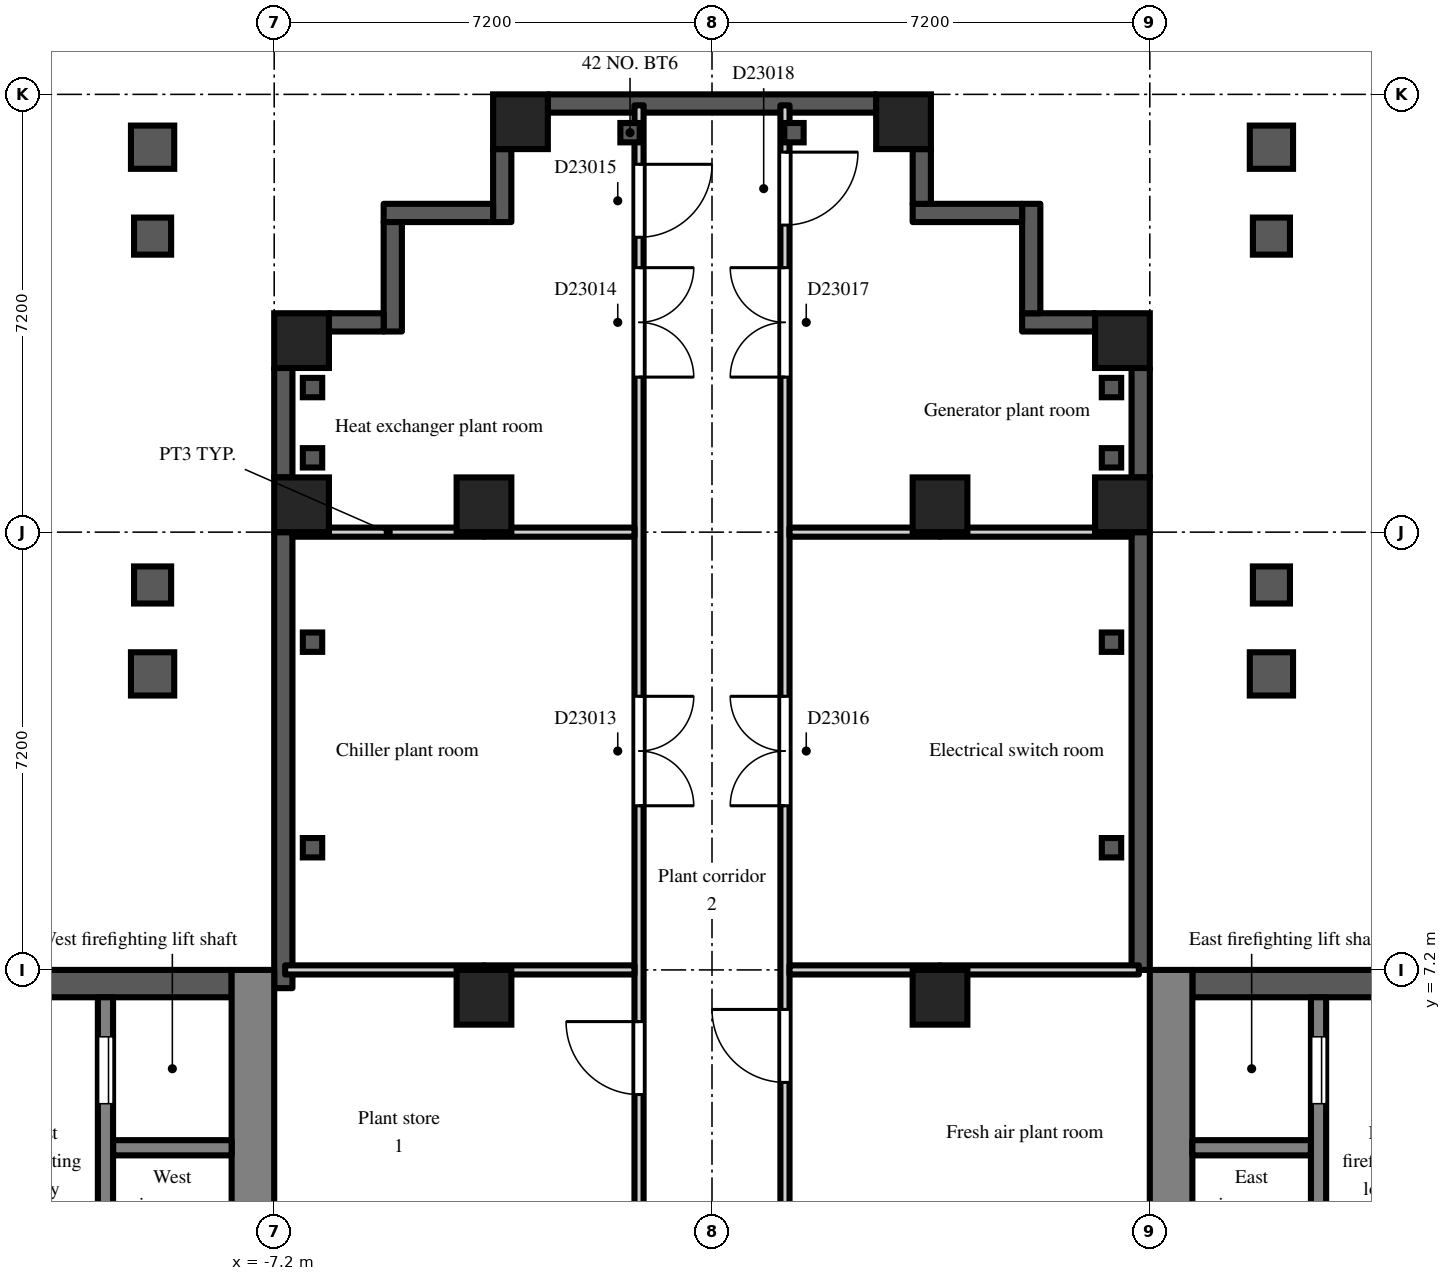
"""IFC4 building model, lengths in metres.
Left out: names, types, materials, properties, quantities, classifications, styles, units other than length and angle.
Written with IfcOpenShell. Run it as: python <this file> out.ifc"""

import sys

from ifc_helpers import new_model, si_unit, direction, frame, frame_2d, origin, origin_2d, place, context, subcontext, project, spatial, rectangle, extrude, element, fill, save


model = new_model("IFC4")
c1 = context("Model", 3, precision=1e-05, world=origin(), true_north=direction((0.0, 1.0)))
c2 = subcontext(c1, "Body", "Model", "MODEL_VIEW")
j1 = project(units=[si_unit("LENGTHUNIT", "METRE"), si_unit("PLANEANGLEUNIT", "RADIAN")], contexts=[c1])
p1 = place(None, origin())
s1 = spatial("IfcSite", under=j1, at=p1, CompositionType="ELEMENT")
p2 = place(p1, origin())
s2 = spatial("IfcBuilding", under=s1, at=p2, CompositionType="ELEMENT")
p3 = place(p2, frame((0.0, 0.0, 162.3)))
s3 = spatial("IfcBuildingStorey", under=s2, at=p3, CompositionType="ELEMENT", Elevation=162.3)
for number, where, z_axis, x_axis in (
    (1, (-6.75, 14.85, 0.0), (0.0, 0.0, 1.0), (1.0, 0.0, 0.0)),
    (2, (-6.75, 17.55, 0.0), (0.0, 0.0, 1.0), (1.0, 0.0, 0.0)),
    (3, (-3.75, 6.75, 0.0), (0.0, 0.0, 1.0), (1.0, 0.0, 0.0)),
    (4, (-3.75, 14.85, 0.0), (0.0, 0.0, 1.0), (1.0, 0.0, 0.0)),
    (5, (-3.15, 21.15, 0.0), (0.0, 0.0, 1.0), (1.0, 0.0, 0.0)),
    (6, (3.15, 21.15, 0.0), (0.0, 0.0, 1.0), (1.0, 0.0, 0.0)),
    (7, (3.75, 6.75, 0.0), (0.0, 0.0, 1.0), (1.0, 0.0, 0.0)),
    (8, (3.75, 14.85, 0.0), (0.0, 0.0, 1.0), (1.0, 0.0, 0.0)),
    (9, (6.75, 14.85, 0.0), (0.0, 0.0, 1.0), (1.0, 0.0, 0.0)),
    (10, (6.75, 17.55, 0.0), (0.0, 0.0, 1.0), (1.0, 0.0, 0.0)),
):
    element("IfcColumn", number, at=place(p3, frame(where, z_axis=z_axis, x_axis=x_axis)), inside=s3, PredefinedType="COLUMN", context=c2, shape_type="SweptSolid", body=[
        extrude(rectangle(XDim=0.9, YDim=0.9, at=origin_2d()), origin(), (0.0, 0.0, 1.0), 4.2),
    ])
p4 = place(p3, frame((7.05, 7.2, 0.0), z_axis=(0.0, 0.0, 1.0), x_axis=(0.0, 1.0, 0.0)))
e11 = element("IfcWall", 11, at=p4, inside=s3, PredefinedType="SOLIDWALL", context=c2, shape_type="SweptSolid", body=[
    extrude(rectangle(XDim=7.2, YDim=0.3, at=frame_2d((3.6, 0.0))), origin(), (0.0, 0.0, 1.0), 3.8),
])
p5 = place(p3, frame((7.05, 15.3, 0.0), z_axis=(0.0, 0.0, 1.0), x_axis=(0.0, 1.0, 0.0)))
e12 = element("IfcWall", 12, at=p5, inside=s3, PredefinedType="SOLIDWALL", context=c2, shape_type="SweptSolid", body=[
    extrude(rectangle(XDim=1.8, YDim=0.3, at=frame_2d((0.9, 0.0))), origin(), (0.0, 0.0, 1.0), 3.4),
])
p6 = place(p3, frame((6.3, 17.85, 0.0), z_axis=(0.0, 0.0, 1.0), x_axis=(-1.0, 0.0, 0.0)))
e13 = element("IfcWall", 13, at=p6, inside=s3, PredefinedType="SOLIDWALL", context=c2, shape_type="SweptSolid", body=[
    extrude(rectangle(XDim=1.2, YDim=0.3, at=frame_2d((0.6, 0.0))), origin(), (0.0, 0.0, 1.0), 3.8),
])
for number, where, z_axis, x_axis in (
    (14, (5.25, 18.0, 0.0), (0.0, 0.0, 1.0), (0.0, 1.0, 0.0)),
    (15, (5.1, 19.65, 0.0), (0.0, 0.0, 1.0), (-1.0, 0.0, 0.0)),
):
    element("IfcWall", number, at=place(p3, frame(where, z_axis=z_axis, x_axis=x_axis)), inside=s3, PredefinedType="SOLIDWALL", context=c2, shape_type="SweptSolid", body=[
        extrude(rectangle(XDim=1.8, YDim=0.3, at=frame_2d((0.9, 0.0))), origin(), (0.0, 0.0, 1.0), 3.8),
    ])
p7 = place(p3, frame((3.45, 19.8, 0.0), z_axis=(0.0, 0.0, 1.0), x_axis=(0.0, 1.0, 0.0)))
e16 = element("IfcWall", 16, at=p7, inside=s3, PredefinedType="SOLIDWALL", context=c2, shape_type="SweptSolid", body=[
    extrude(rectangle(XDim=0.9, YDim=0.3, at=frame_2d((0.45, 0.0))), origin(), (0.0, 0.0, 1.0), 3.8),
])
p8 = place(p3, frame((2.7, 21.45, 0.0), z_axis=(0.0, 0.0, 1.0), x_axis=(-1.0, 0.0, 0.0)))
e17 = element("IfcWall", 17, at=p8, inside=s3, PredefinedType="SOLIDWALL", context=c2, shape_type="SweptSolid", body=[
    extrude(rectangle(XDim=5.4, YDim=0.3, at=frame_2d((2.7, 0.0))), origin(), (0.0, 0.0, 1.0), 3.4),
])
p9 = place(p3, frame((-3.45, 20.7, 0.0), z_axis=(0.0, 0.0, 1.0), x_axis=(0.0, -1.0, 0.0)))
e18 = element("IfcWall", 18, at=p9, inside=s3, PredefinedType="SOLIDWALL", context=c2, shape_type="SweptSolid", body=[
    extrude(rectangle(XDim=1.2, YDim=0.3, at=frame_2d((0.6, 0.0))), origin(), (0.0, 0.0, 1.0), 3.8),
])
p10 = place(p3, frame((-3.6, 19.65, 0.0), z_axis=(0.0, 0.0, 1.0), x_axis=(-1.0, 0.0, 0.0)))
e19 = element("IfcWall", 19, at=p10, inside=s3, PredefinedType="SOLIDWALL", context=c2, shape_type="SweptSolid", body=[
    extrude(rectangle(XDim=1.8, YDim=0.3, at=frame_2d((0.9, 0.0))), origin(), (0.0, 0.0, 1.0), 3.8),
])
p11 = place(p3, frame((-5.25, 19.5, 0.0), z_axis=(0.0, 0.0, 1.0), x_axis=(0.0, -1.0, 0.0)))
e20 = element("IfcWall", 20, at=p11, inside=s3, PredefinedType="SOLIDWALL", context=c2, shape_type="SweptSolid", body=[
    extrude(rectangle(XDim=1.8, YDim=0.3, at=frame_2d((0.9, 0.0))), origin(), (0.0, 0.0, 1.0), 3.8),
])
p12 = place(p3, frame((-5.4, 17.85, 0.0), z_axis=(0.0, 0.0, 1.0), x_axis=(-1.0, 0.0, 0.0)))
e21 = element("IfcWall", 21, at=p12, inside=s3, PredefinedType="SOLIDWALL", context=c2, shape_type="SweptSolid", body=[
    extrude(rectangle(XDim=0.9, YDim=0.3, at=frame_2d((0.45, 0.0))), origin(), (0.0, 0.0, 1.0), 3.8),
])
p13 = place(p3, frame((-7.05, 17.1, 0.0), z_axis=(0.0, 0.0, 1.0), x_axis=(0.0, -1.0, 0.0)))
e22 = element("IfcWall", 22, at=p13, inside=s3, PredefinedType="SOLIDWALL", context=c2, shape_type="SweptSolid", body=[
    extrude(rectangle(XDim=1.8, YDim=0.3, at=frame_2d((0.9, 0.0))), origin(), (0.0, 0.0, 1.0), 3.4),
])
p14 = place(p3, frame((-7.05, 14.4, 0.0), z_axis=(0.0, 0.0, 1.0), x_axis=(0.0, -1.0, 0.0)))
e23 = element("IfcWall", 23, at=p14, inside=s3, PredefinedType="SOLIDWALL", context=c2, shape_type="SweptSolid", body=[
    extrude(rectangle(XDim=7.5, YDim=0.3, at=frame_2d((3.75, 0.0))), origin(), (0.0, 0.0, 1.0), 3.8),
])
p15 = place(p3, frame((7.55, -7.2, 0.0), z_axis=(0.0, 0.0, 1.0), x_axis=(0.0, 1.0, 0.0)))
e24 = element("IfcWall", 24, at=p15, inside=s3, PredefinedType="SHEAR", context=c2, shape_type="SweptSolid", body=[
    extrude(rectangle(XDim=14.4, YDim=0.7, at=frame_2d((7.2, 0.0))), origin(), (0.0, 0.0, 1.0), 3.8),
])
p16 = place(p15, frame((6.0, 0.0, 0.0)))
e25 = element("IfcOpeningElement", 25, at=p16, cuts=e24, PredefinedType="OPENING", context=c2, shape_type="SweptSolid", body=[
    extrude(rectangle(XDim=2.4, YDim=2.2, at=frame_2d((1.2, 1.1))), frame((0.0, 0.36, 0.0), z_axis=(0.0, -1.0, 0.0), x_axis=(1.0, 0.0, 0.0)), (0.0, 0.0, 1.0), 0.72),
])
p17 = place(p3, frame((7.9, 6.975, 0.0), z_axis=(0.0, 0.0, 1.0), x_axis=(1.0, 0.0, 0.0)))
e26 = element("IfcWall", 26, at=p17, inside=s3, PredefinedType="SHEAR", context=c2, shape_type="SweptSolid", body=[
    extrude(rectangle(XDim=12.95, YDim=0.45, at=frame_2d((6.475, 0.0))), origin(), (0.0, 0.0, 1.0), 3.8),
])
p18 = place(p3, frame((7.9, 4.275, 0.0), z_axis=(0.0, 0.0, 1.0), x_axis=(1.0, 0.0, 0.0)))
e27 = element("IfcWall", 27, at=p18, inside=s3, PredefinedType="SHEAR", context=c2, shape_type="SweptSolid", body=[
    extrude(rectangle(XDim=1.95, YDim=0.25, at=frame_2d((0.975, 0.0))), origin(), (0.0, 0.0, 1.0), 3.8),
])
p19 = place(p3, frame((9.975, 2.05, 0.0), z_axis=(0.0, 0.0, 1.0), x_axis=(0.0, 1.0, 0.0)))
e28 = element("IfcWall", 28, at=p19, inside=s3, PredefinedType="SHEAR", context=c2, shape_type="SweptSolid", body=[
    extrude(rectangle(XDim=4.7, YDim=0.25, at=frame_2d((2.35, 0.0))), origin(), (0.0, 0.0, 1.0), 3.8),
])
p20 = place(p19, frame((2.95, 0.0, 0.0)))
e29 = element("IfcOpeningElement", 29, at=p20, cuts=e28, PredefinedType="OPENING", context=c2, shape_type="SweptSolid", body=[
    extrude(rectangle(XDim=1.1, YDim=2.1, at=frame_2d((0.55, 1.05))), frame((0.0, 0.135, 0.0), z_axis=(0.0, -1.0, 0.0), x_axis=(1.0, 0.0, 0.0)), (0.0, 0.0, 1.0), 0.27),
])
p21 = place(p3, frame((-7.55, -7.2, 0.0), z_axis=(0.0, 0.0, 1.0), x_axis=(0.0, 1.0, 0.0)))
e30 = element("IfcWall", 30, at=p21, inside=s3, PredefinedType="SHEAR", context=c2, shape_type="SweptSolid", body=[
    extrude(rectangle(XDim=14.4, YDim=0.7, at=frame_2d((7.2, 0.0))), origin(), (0.0, 0.0, 1.0), 3.8),
])
p22 = place(p21, frame((6.0, 0.0, 0.0)))
e31 = element("IfcOpeningElement", 31, at=p22, cuts=e30, PredefinedType="OPENING", context=c2, shape_type="SweptSolid", body=[
    extrude(rectangle(XDim=2.4, YDim=2.2, at=frame_2d((1.2, 1.1))), frame((0.0, 0.36, 0.0), z_axis=(0.0, -1.0, 0.0), x_axis=(1.0, 0.0, 0.0)), (0.0, 0.0, 1.0), 0.72),
])
p23 = place(p3, frame((-7.9, 6.975, 0.0), z_axis=(0.0, 0.0, 1.0), x_axis=(-1.0, 0.0, 0.0)))
e32 = element("IfcWall", 32, at=p23, inside=s3, PredefinedType="SHEAR", context=c2, shape_type="SweptSolid", body=[
    extrude(rectangle(XDim=12.95, YDim=0.45, at=frame_2d((6.475, 0.0))), origin(), (0.0, 0.0, 1.0), 3.8),
])
p24 = place(p3, frame((-7.9, 4.275, 0.0), z_axis=(0.0, 0.0, 1.0), x_axis=(-1.0, 0.0, 0.0)))
e33 = element("IfcWall", 33, at=p24, inside=s3, PredefinedType="SHEAR", context=c2, shape_type="SweptSolid", body=[
    extrude(rectangle(XDim=1.95, YDim=0.25, at=frame_2d((0.975, 0.0))), origin(), (0.0, 0.0, 1.0), 3.8),
])
p25 = place(p3, frame((-9.975, 2.05, 0.0), z_axis=(0.0, 0.0, 1.0), x_axis=(0.0, 1.0, 0.0)))
e34 = element("IfcWall", 34, at=p25, inside=s3, PredefinedType="SHEAR", context=c2, shape_type="SweptSolid", body=[
    extrude(rectangle(XDim=4.7, YDim=0.25, at=frame_2d((2.35, 0.0))), origin(), (0.0, 0.0, 1.0), 3.8),
])
p26 = place(p25, frame((2.95, 0.0, 0.0)))
e35 = element("IfcOpeningElement", 35, at=p26, cuts=e34, PredefinedType="OPENING", context=c2, shape_type="SweptSolid", body=[
    extrude(rectangle(XDim=1.1, YDim=2.1, at=frame_2d((0.55, 1.05))), frame((0.0, 0.135, 0.0), z_axis=(0.0, -1.0, 0.0), x_axis=(1.0, 0.0, 0.0)), (0.0, 0.0, 1.0), 0.27),
])
p27 = place(p3, frame((-7.02, 7.2, 0.0), z_axis=(0.0, 0.0, 1.0), x_axis=(1.0, 0.0, 0.0)))
e36 = element("IfcWall", 36, at=p27, inside=s3, PredefinedType="PARTITIONING", context=c2, shape_type="SweptSolid", body=[
    extrude(rectangle(XDim=3.27, YDim=0.15, at=frame_2d((1.635, 0.0))), origin(), (0.0, 0.0, 1.0), 3.4),
])
p28 = place(p3, frame((-6.9, 14.4, 0.0), z_axis=(0.0, 0.0, 1.0), x_axis=(1.0, 0.0, 0.0)))
e37 = element("IfcWall", 37, at=p28, inside=s3, PredefinedType="PARTITIONING", context=c2, shape_type="SweptSolid", body=[
    extrude(rectangle(XDim=3.15, YDim=0.15, at=frame_2d((1.575, 0.0))), origin(), (0.0, 0.0, 1.0), 3.4),
])
p29 = place(p3, frame((-1.2, 1.125, 0.0), z_axis=(0.0, 0.0, 1.0), x_axis=(0.0, 1.0, 0.0)))
e38 = element("IfcWall", 38, at=p29, inside=s3, PredefinedType="PARTITIONING", context=c2, shape_type="SweptSolid", body=[
    extrude(rectangle(XDim=20.295, YDim=0.15, at=frame_2d((10.147, 0.0))), origin(), (0.0, 0.0, 1.0), 3.8),
])
p30 = place(p29, frame((4.025, 0.0, 0.0)))
e39 = element("IfcOpeningElement", 39, at=p30, cuts=e38, PredefinedType="OPENING", context=c2, shape_type="SweptSolid", body=[
    extrude(rectangle(XDim=1.2, YDim=2.1, at=frame_2d((0.6, 1.05))), frame((0.0, 0.085, 0.0), z_axis=(0.0, -1.0, 0.0), x_axis=(1.0, 0.0, 0.0)), (0.0, 0.0, 1.0), 0.17),
])
p31 = place(p29, frame((8.775, 0.0, 0.0)))
e40 = element("IfcOpeningElement", 40, at=p31, cuts=e38, PredefinedType="OPENING", context=c2, shape_type="SweptSolid", body=[
    extrude(rectangle(XDim=1.8, YDim=2.1, at=frame_2d((0.9, 1.05))), frame((0.0, 0.085, 0.0), z_axis=(0.0, -1.0, 0.0), x_axis=(1.0, 0.0, 0.0)), (0.0, 0.0, 1.0), 0.17),
])
p32 = place(p29, frame((15.825, 0.0, 0.0)))
e41 = element("IfcOpeningElement", 41, at=p32, cuts=e38, PredefinedType="OPENING", context=c2, shape_type="SweptSolid", body=[
    extrude(rectangle(XDim=1.8, YDim=2.1, at=frame_2d((0.9, 1.05))), frame((0.0, 0.085, 0.0), z_axis=(0.0, -1.0, 0.0), x_axis=(1.0, 0.0, 0.0)), (0.0, 0.0, 1.0), 0.17),
])
p33 = place(p29, frame((18.125, 0.0, 0.0)))
e42 = element("IfcOpeningElement", 42, at=p33, cuts=e38, PredefinedType="OPENING", context=c2, shape_type="SweptSolid", body=[
    extrude(rectangle(XDim=1.2, YDim=2.1, at=frame_2d((0.6, 1.05))), frame((0.0, 0.085, 0.0), z_axis=(0.0, -1.0, 0.0), x_axis=(1.0, 0.0, 0.0)), (0.0, 0.0, 1.0), 0.17),
])
p34 = place(p3, frame((1.2, 1.125, 0.0), z_axis=(0.0, 0.0, 1.0), x_axis=(0.0, 1.0, 0.0)))
e43 = element("IfcWall", 43, at=p34, inside=s3, PredefinedType="PARTITIONING", context=c2, shape_type="SweptSolid", body=[
    extrude(rectangle(XDim=20.295, YDim=0.15, at=frame_2d((10.147, 0.0))), origin(), (0.0, 0.0, 1.0), 3.8),
])
p35 = place(p34, frame((0.175, 0.0, 0.0)))
e44 = element("IfcOpeningElement", 44, at=p35, cuts=e43, PredefinedType="OPENING", context=c2, shape_type="SweptSolid", body=[
    extrude(rectangle(XDim=0.9, YDim=2.1, at=frame_2d((0.45, 1.05))), frame((0.0, 0.085, 0.0), z_axis=(0.0, -1.0, 0.0), x_axis=(1.0, 0.0, 0.0)), (0.0, 0.0, 1.0), 0.17),
])
p36 = place(p34, frame((4.225, 0.0, 0.0)))
e45 = element("IfcOpeningElement", 45, at=p36, cuts=e43, PredefinedType="OPENING", context=c2, shape_type="SweptSolid", body=[
    extrude(rectangle(XDim=1.2, YDim=2.1, at=frame_2d((0.6, 1.05))), frame((0.0, 0.085, 0.0), z_axis=(0.0, -1.0, 0.0), x_axis=(1.0, 0.0, 0.0)), (0.0, 0.0, 1.0), 0.17),
])
p37 = place(p34, frame((8.775, 0.0, 0.0)))
e46 = element("IfcOpeningElement", 46, at=p37, cuts=e43, PredefinedType="OPENING", context=c2, shape_type="SweptSolid", body=[
    extrude(rectangle(XDim=1.8, YDim=2.1, at=frame_2d((0.9, 1.05))), frame((0.0, 0.085, 0.0), z_axis=(0.0, -1.0, 0.0), x_axis=(1.0, 0.0, 0.0)), (0.0, 0.0, 1.0), 0.17),
])
p38 = place(p34, frame((15.825, 0.0, 0.0)))
e47 = element("IfcOpeningElement", 47, at=p38, cuts=e43, PredefinedType="OPENING", context=c2, shape_type="SweptSolid", body=[
    extrude(rectangle(XDim=1.8, YDim=2.1, at=frame_2d((0.9, 1.05))), frame((0.0, 0.085, 0.0), z_axis=(0.0, -1.0, 0.0), x_axis=(1.0, 0.0, 0.0)), (0.0, 0.0, 1.0), 0.17),
])
p39 = place(p34, frame((18.325, 0.0, 0.0)))
e48 = element("IfcOpeningElement", 48, at=p39, cuts=e43, PredefinedType="OPENING", context=c2, shape_type="SweptSolid", body=[
    extrude(rectangle(XDim=1.2, YDim=2.1, at=frame_2d((0.6, 1.05))), frame((0.0, 0.085, 0.0), z_axis=(0.0, -1.0, 0.0), x_axis=(1.0, 0.0, 0.0)), (0.0, 0.0, 1.0), 0.17),
])
for number, where, z_axis, x_axis in (
    (49, (1.275, 7.2, 0.0), (0.0, 0.0, 1.0), (1.0, 0.0, 0.0)),
    (50, (1.275, 14.4, 0.0), (0.0, 0.0, 1.0), (1.0, 0.0, 0.0)),
    (51, (-3.75, 7.2, 0.0), (0.0, 0.0, 1.0), (1.0, 0.0, 0.0)),
    (52, (-3.75, 14.4, 0.0), (0.0, 0.0, 1.0), (1.0, 0.0, 0.0)),
):
    element("IfcWall", number, at=place(p3, frame(where, z_axis=z_axis, x_axis=x_axis)), inside=s3, PredefinedType="PARTITIONING", context=c2, shape_type="SweptSolid", body=[
        extrude(rectangle(XDim=2.475, YDim=0.15, at=frame_2d((1.238, 0.0))), origin(), (0.0, 0.0, 1.0), 3.8),
    ])
p40 = place(p3, frame((3.75, 7.2, 0.0), z_axis=(0.0, 0.0, 1.0), x_axis=(1.0, 0.0, 0.0)))
e53 = element("IfcWall", 53, at=p40, inside=s3, PredefinedType="PARTITIONING", context=c2, shape_type="SweptSolid", body=[
    extrude(rectangle(XDim=3.27, YDim=0.15, at=frame_2d((1.635, 0.0))), origin(), (0.0, 0.0, 1.0), 3.4),
])
p41 = place(p3, frame((3.75, 14.4, 0.0), z_axis=(0.0, 0.0, 1.0), x_axis=(1.0, 0.0, 0.0)))
e54 = element("IfcWall", 54, at=p41, inside=s3, PredefinedType="PARTITIONING", context=c2, shape_type="SweptSolid", body=[
    extrude(rectangle(XDim=3.15, YDim=0.15, at=frame_2d((1.575, 0.0))), origin(), (0.0, 0.0, 1.0), 3.4),
])
p42 = place(p20, origin())
e55 = element("IfcDoor", 55, at=p42, inside=s3, OperationType="SLIDING_TO_LEFT", PredefinedType="DOOR", context=c2, shape_type="SweptSolid", body=[
    extrude(rectangle(XDim=1.1, YDim=2.1, at=frame_2d((0.55, 1.05))), frame((0.0, 0.025, 0.0), z_axis=(0.0, -1.0, 0.0), x_axis=(1.0, 0.0, 0.0)), (0.0, 0.0, 1.0), 0.05),
])
fill(e29, e55)
p43 = place(p26, origin())
e56 = element("IfcDoor", 56, at=p43, inside=s3, OperationType="SLIDING_TO_LEFT", PredefinedType="DOOR", context=c2, shape_type="SweptSolid", body=[
    extrude(rectangle(XDim=1.1, YDim=2.1, at=frame_2d((0.55, 1.05))), frame((0.0, 0.025, 0.0), z_axis=(0.0, -1.0, 0.0), x_axis=(1.0, 0.0, 0.0)), (0.0, 0.0, 1.0), 0.05),
])
fill(e35, e56)
p44 = place(p36, origin())
e57 = element("IfcDoor", 57, at=p44, inside=s3, OperationType="SINGLE_SWING_RIGHT", PredefinedType="DOOR", context=c2, shape_type="SweptSolid", body=[
    extrude(rectangle(XDim=1.2, YDim=2.1, at=frame_2d((0.6, 1.05))), frame((0.0, 0.025, 0.0), z_axis=(0.0, -1.0, 0.0), x_axis=(1.0, 0.0, 0.0)), (0.0, 0.0, 1.0), 0.05),
])
fill(e45, e57)
p45 = place(p30, origin())
e58 = element("IfcDoor", 58, at=p45, inside=s3, OperationType="SINGLE_SWING_RIGHT", PredefinedType="DOOR", context=c2, shape_type="SweptSolid", body=[
    extrude(rectangle(XDim=1.2, YDim=2.1, at=frame_2d((0.6, 1.05))), frame((0.0, 0.025, 0.0), z_axis=(0.0, -1.0, 0.0), x_axis=(1.0, 0.0, 0.0)), (0.0, 0.0, 1.0), 0.05),
])
fill(e39, e58)
p46 = place(p31, frame((1.8, 0.0, 0.0), z_axis=(0.0, 0.0, 1.0), x_axis=(-1.0, 0.0, 0.0)))
e59 = element("IfcDoor", 59, at=p46, inside=s3, OperationType="DOUBLE_DOOR_DOUBLE_SWING", PredefinedType="DOOR", context=c2, shape_type="SweptSolid", body=[
    extrude(rectangle(XDim=1.8, YDim=2.1, at=frame_2d((0.9, 1.05))), frame((0.0, 0.025, 0.0), z_axis=(0.0, -1.0, 0.0), x_axis=(1.0, 0.0, 0.0)), (0.0, 0.0, 1.0), 0.05),
])
fill(e40, e59)
p47 = place(p32, frame((1.8, 0.0, 0.0), z_axis=(0.0, 0.0, 1.0), x_axis=(-1.0, 0.0, 0.0)))
e60 = element("IfcDoor", 60, at=p47, inside=s3, OperationType="DOUBLE_DOOR_DOUBLE_SWING", PredefinedType="DOOR", context=c2, shape_type="SweptSolid", body=[
    extrude(rectangle(XDim=1.8, YDim=2.1, at=frame_2d((0.9, 1.05))), frame((0.0, 0.025, 0.0), z_axis=(0.0, -1.0, 0.0), x_axis=(1.0, 0.0, 0.0)), (0.0, 0.0, 1.0), 0.05),
])
fill(e41, e60)
p48 = place(p33, frame((1.2, 0.0, 0.0), z_axis=(0.0, 0.0, 1.0), x_axis=(-1.0, 0.0, 0.0)))
e61 = element("IfcDoor", 61, at=p48, inside=s3, OperationType="SINGLE_SWING_LEFT", PredefinedType="DOOR", context=c2, shape_type="SweptSolid", body=[
    extrude(rectangle(XDim=1.2, YDim=2.1, at=frame_2d((0.6, 1.05))), frame((0.0, 0.025, 0.0), z_axis=(0.0, -1.0, 0.0), x_axis=(1.0, 0.0, 0.0)), (0.0, 0.0, 1.0), 0.05),
])
fill(e42, e61)
p49 = place(p37, origin())
e62 = element("IfcDoor", 62, at=p49, inside=s3, OperationType="DOUBLE_DOOR_DOUBLE_SWING", PredefinedType="DOOR", context=c2, shape_type="SweptSolid", body=[
    extrude(rectangle(XDim=1.8, YDim=2.1, at=frame_2d((0.9, 1.05))), frame((0.0, 0.025, 0.0), z_axis=(0.0, -1.0, 0.0), x_axis=(1.0, 0.0, 0.0)), (0.0, 0.0, 1.0), 0.05),
])
fill(e46, e62)
p50 = place(p38, origin())
e63 = element("IfcDoor", 63, at=p50, inside=s3, OperationType="DOUBLE_DOOR_DOUBLE_SWING", PredefinedType="DOOR", context=c2, shape_type="SweptSolid", body=[
    extrude(rectangle(XDim=1.8, YDim=2.1, at=frame_2d((0.9, 1.05))), frame((0.0, 0.025, 0.0), z_axis=(0.0, -1.0, 0.0), x_axis=(1.0, 0.0, 0.0)), (0.0, 0.0, 1.0), 0.05),
])
fill(e47, e63)
p51 = place(p39, frame((1.2, 0.0, 0.0), z_axis=(0.0, 0.0, 1.0), x_axis=(-1.0, 0.0, 0.0)))
e64 = element("IfcDoor", 64, at=p51, inside=s3, OperationType="SINGLE_SWING_LEFT", PredefinedType="DOOR", context=c2, shape_type="SweptSolid", body=[
    extrude(rectangle(XDim=1.2, YDim=2.1, at=frame_2d((0.6, 1.05))), frame((0.0, 0.025, 0.0), z_axis=(0.0, -1.0, 0.0), x_axis=(1.0, 0.0, 0.0)), (0.0, 0.0, 1.0), 0.05),
])
fill(e48, e64)
save(model, sys.argv[1])
